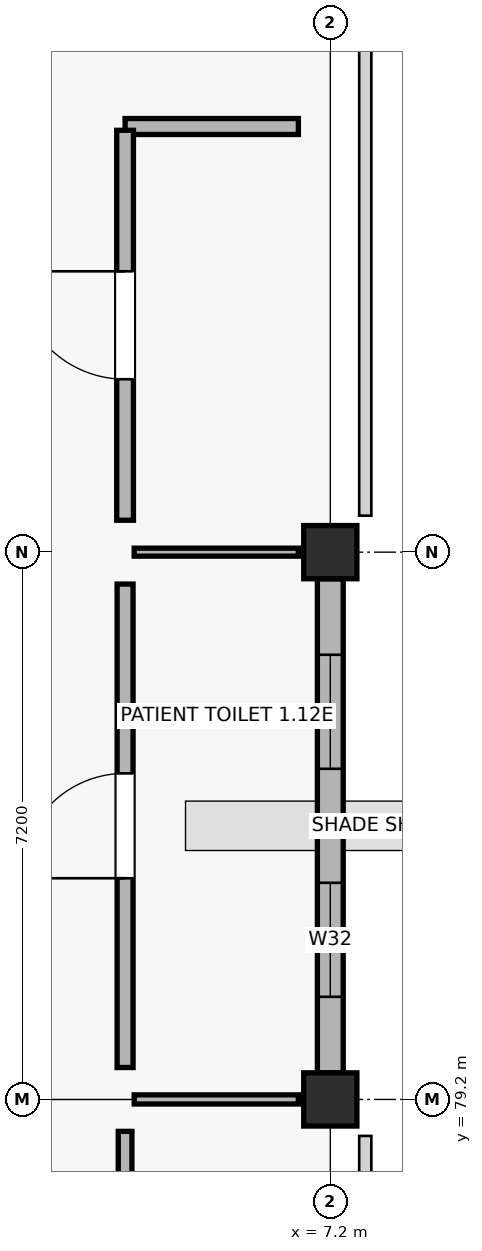
"""IFC4 building model, lengths in metres.
Left out: names, types, materials, properties, quantities, classifications, styles, units other than length and angle.
Written with IfcOpenShell. Run it as: python <this file> out.ifc"""

import sys

from ifc_helpers import new_model, si_unit, direction, frame, frame_2d, origin, origin_2d, place, context, subcontext, project, spatial, rectangle, extrude, element, fill, save


model = new_model("IFC4")
c1 = context("Model", 3, precision=1e-05, world=origin(), true_north=direction((0.0, 1.0)))
c2 = subcontext(c1, "Body", "Model", "MODEL_VIEW")
j1 = project(units=[si_unit("LENGTHUNIT", "METRE"), si_unit("PLANEANGLEUNIT", "RADIAN")], contexts=[c1])
p1 = place(None, origin())
s1 = spatial("IfcSite", under=j1, at=p1, CompositionType="ELEMENT")
p2 = place(p1, origin())
s2 = spatial("IfcBuilding", under=s1, at=p2, CompositionType="ELEMENT")
p3 = place(p2, origin())
s3 = spatial("IfcBuildingStorey", under=s2, at=p3, CompositionType="ELEMENT", Elevation=0.0)
for number, where, z_axis, x_axis in (
    (1, (7.2, 79.2, -0.25), (0.0, 0.0, 1.0), (1.0, 0.0, 0.0)),
    (2, (7.2, 86.4, -0.25), (0.0, 0.0, 1.0), (1.0, 0.0, 0.0)),
):
    element("IfcColumn", number, at=place(p3, frame(where, z_axis=z_axis, x_axis=x_axis)), inside=s3, PredefinedType="COLUMN", context=c2, shape_type="SweptSolid", body=[
        extrude(rectangle(XDim=0.7, YDim=0.7, at=origin_2d()), origin(), (0.0, 0.0, 1.0), 4.75),
    ])
p4 = place(p3, frame((7.2, 79.55, 0.0), z_axis=(0.0, 0.0, 1.0), x_axis=(0.0, 1.0, 0.0)))
e3 = element("IfcWall", 3, at=p4, inside=s3, PredefinedType="SOLIDWALL", context=c2, shape_type="SweptSolid", body=[
    extrude(rectangle(XDim=6.5, YDim=0.34, at=frame_2d((3.25, 0.0))), origin(), (0.0, 0.0, 1.0), 3.52),
])
p5 = place(p4, frame((1.0, 0.0, 0.9)))
e4 = element("IfcOpeningElement", 4, at=p5, cuts=e3, PredefinedType="OPENING", context=c2, shape_type="SweptSolid", body=[
    extrude(rectangle(XDim=1.5, YDim=1.62, at=frame_2d((0.75, 0.81))), frame((0.0, 0.18, 0.0), z_axis=(0.0, -1.0, 0.0), x_axis=(1.0, 0.0, 0.0)), (0.0, 0.0, 1.0), 0.36),
])
p6 = place(p4, frame((4.0, 0.0, 0.9)))
e5 = element("IfcOpeningElement", 5, at=p6, cuts=e3, PredefinedType="OPENING", context=c2, shape_type="SweptSolid", body=[
    extrude(rectangle(XDim=1.5, YDim=1.62, at=frame_2d((0.75, 0.81))), frame((0.0, 0.18, 0.0), z_axis=(0.0, -1.0, 0.0), x_axis=(1.0, 0.0, 0.0)), (0.0, 0.0, 1.0), 0.36),
])
p7 = place(p3, frame((4.5, 72.42, 0.0), z_axis=(0.0, 0.0, 1.0), x_axis=(0.0, 1.0, 0.0)))
e6 = element("IfcWall", 6, at=p7, inside=s3, PredefinedType="PARTITIONING", context=c2, shape_type="SweptSolid", body=[
    extrude(rectangle(XDim=6.36, YDim=0.18, at=frame_2d((3.18, 0.0))), origin(), (0.0, 0.0, 1.0), 3.36),
])
p8 = place(p7, frame((2.53, 0.0, 0.0)))
e7 = element("IfcOpeningElement", 7, at=p8, cuts=e6, PredefinedType="OPENING", context=c2, shape_type="SweptSolid", body=[
    extrude(rectangle(XDim=1.3, YDim=2.04, at=frame_2d((0.65, 1.02))), frame((0.0, 0.1, 0.0), z_axis=(0.0, -1.0, 0.0), x_axis=(1.0, 0.0, 0.0)), (0.0, 0.0, 1.0), 0.2),
])
p9 = place(p3, frame((4.62, 79.2, 0.0), z_axis=(0.0, 0.0, 1.0), x_axis=(1.0, 0.0, 0.0)))
e8 = element("IfcWall", 8, at=p9, inside=s3, PredefinedType="PARTITIONING", context=c2, shape_type="SweptSolid", body=[
    extrude(rectangle(XDim=2.16, YDim=0.12, at=frame_2d((1.08, 0.0))), origin(), (0.0, 0.0, 1.0), 3.36),
])
p10 = place(p3, frame((4.5, 79.62, 0.0), z_axis=(0.0, 0.0, 1.0), x_axis=(0.0, 1.0, 0.0)))
e9 = element("IfcWall", 9, at=p10, inside=s3, PredefinedType="PLUMBINGWALL", context=c2, shape_type="SweptSolid", body=[
    extrude(rectangle(XDim=6.36, YDim=0.21, at=frame_2d((3.18, 0.0))), origin(), (0.0, 0.0, 1.0), 3.36),
])
p11 = place(p10, frame((2.49, 0.0, 0.0)))
e10 = element("IfcOpeningElement", 10, at=p11, cuts=e9, PredefinedType="OPENING", context=c2, shape_type="SweptSolid", body=[
    extrude(rectangle(XDim=1.38, YDim=2.04, at=frame_2d((0.69, 1.02))), frame((0.0, 0.115, 0.0), z_axis=(0.0, -1.0, 0.0), x_axis=(1.0, 0.0, 0.0)), (0.0, 0.0, 1.0), 0.23),
])
p12 = place(p3, frame((4.62, 86.4, 0.0), z_axis=(0.0, 0.0, 1.0), x_axis=(1.0, 0.0, 0.0)))
e11 = element("IfcWall", 11, at=p12, inside=s3, PredefinedType="PARTITIONING", context=c2, shape_type="SweptSolid", body=[
    extrude(rectangle(XDim=2.16, YDim=0.105, at=frame_2d((1.08, 0.0))), origin(), (0.0, 0.0, 1.0), 3.36),
])
p13 = place(p3, frame((4.5, 92.0, 0.0), z_axis=(0.0, 0.0, 1.0), x_axis=(1.0, 0.0, 0.0)))
e12 = element("IfcWall", 12, at=p13, inside=s3, PredefinedType="PLUMBINGWALL", context=c2, shape_type="SweptSolid", body=[
    extrude(rectangle(XDim=2.28, YDim=0.21, at=frame_2d((1.14, 0.0))), origin(), (0.0, 0.0, 1.0), 3.36),
])
p14 = place(p3, frame((4.5, 86.82, 0.0), z_axis=(0.0, 0.0, 1.0), x_axis=(0.0, 1.0, 0.0)))
e13 = element("IfcWall", 13, at=p14, inside=s3, PredefinedType="SOLIDWALL", context=c2, shape_type="SweptSolid", body=[
    extrude(rectangle(XDim=5.13, YDim=0.22, at=frame_2d((2.565, 0.0))), origin(), (0.0, 0.0, 1.0), 3.36),
])
p15 = place(p14, frame((1.855, 0.0, 0.0)))
e14 = element("IfcOpeningElement", 14, at=p15, cuts=e13, PredefinedType="OPENING", context=c2, shape_type="SweptSolid", body=[
    extrude(rectangle(XDim=1.42, YDim=2.04, at=frame_2d((0.71, 1.02))), frame((0.0, 0.12, 0.0), z_axis=(0.0, -1.0, 0.0), x_axis=(1.0, 0.0, 0.0)), (0.0, 0.0, 1.0), 0.24),
])
p16 = place(p5, origin())
e15 = element("IfcWindow", 15, at=p16, inside=s3, PartitioningType="SINGLE_PANEL", PredefinedType="WINDOW", context=c2, shape_type="SweptSolid", body=[
    extrude(rectangle(XDim=1.5, YDim=1.62, at=frame_2d((0.75, 0.81))), frame((0.0, 0.03, 0.0), z_axis=(0.0, -1.0, 0.0), x_axis=(1.0, 0.0, 0.0)), (0.0, 0.0, 1.0), 0.06),
])
fill(e4, e15)
p17 = place(p6, origin())
e16 = element("IfcWindow", 16, at=p17, inside=s3, PartitioningType="SINGLE_PANEL", PredefinedType="WINDOW", context=c2, shape_type="SweptSolid", body=[
    extrude(rectangle(XDim=1.5, YDim=1.62, at=frame_2d((0.75, 0.81))), frame((0.0, 0.03, 0.0), z_axis=(0.0, -1.0, 0.0), x_axis=(1.0, 0.0, 0.0)), (0.0, 0.0, 1.0), 0.06),
])
fill(e5, e16)
p18 = place(p11, origin())
e17 = element("IfcDoor", 17, at=p18, inside=s3, OperationType="SINGLE_SWING_LEFT", PredefinedType="DOOR", context=c2, shape_type="SweptSolid", body=[
    extrude(rectangle(XDim=1.38, YDim=2.04, at=frame_2d((0.69, 1.02))), frame((0.0, 0.025, 0.0), z_axis=(0.0, -1.0, 0.0), x_axis=(1.0, 0.0, 0.0)), (0.0, 0.0, 1.0), 0.05),
])
fill(e10, e17)
p19 = place(p15, origin())
e18 = element("IfcDoor", 18, at=p19, inside=s3, OperationType="SINGLE_SWING_RIGHT", PredefinedType="DOOR", context=c2, shape_type="SweptSolid", body=[
    extrude(rectangle(XDim=1.42, YDim=2.04, at=frame_2d((0.71, 1.02))), frame((0.0, 0.025, 0.0), z_axis=(0.0, -1.0, 0.0), x_axis=(1.0, 0.0, 0.0)), (0.0, 0.0, 1.0), 0.05),
])
fill(e14, e18)
save(model, sys.argv[1])
